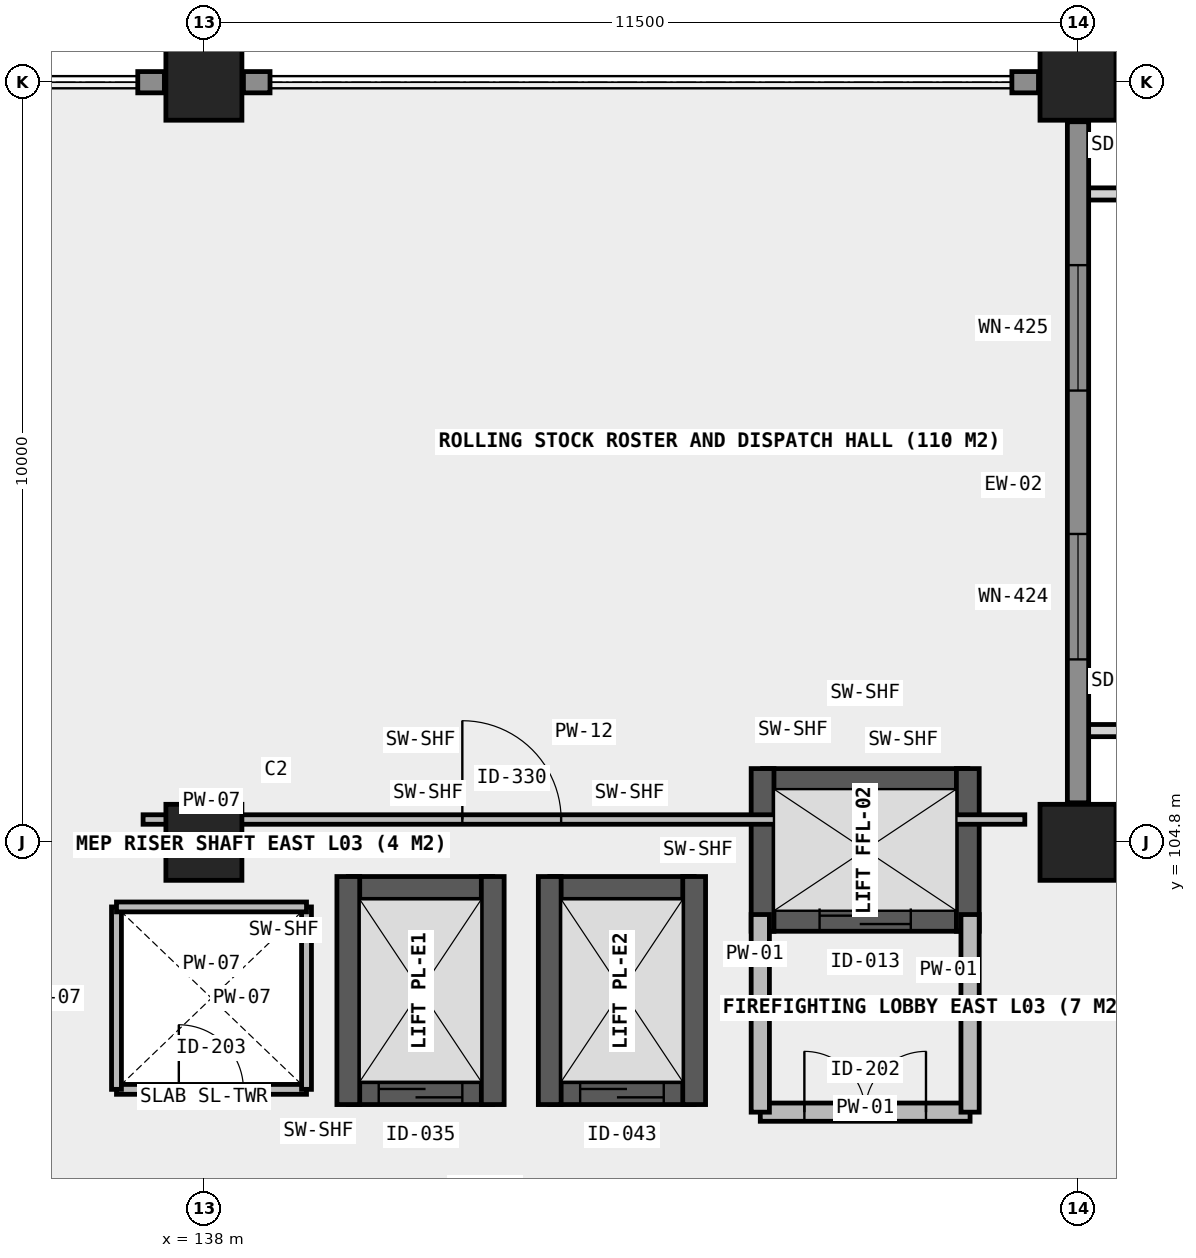
"""IFC4 building model, lengths in metres.
Left out: names, types, materials, properties, quantities, classifications, styles, units other than length and angle.
Written with IfcOpenShell. Run it as: python <this file> out.ifc"""

import sys

from ifc_helpers import new_model, si_unit, direction, frame, frame_2d, origin, origin_2d, place, context, subcontext, project, spatial, rectangle, extrude, element, fill, save


model = new_model("IFC4")
c1 = context("Model", 3, precision=1e-05, world=origin(), true_north=direction((0.0, 1.0)))
c2 = subcontext(c1, "Body", "Model", "MODEL_VIEW")
j1 = project(units=[si_unit("LENGTHUNIT", "METRE"), si_unit("PLANEANGLEUNIT", "RADIAN")], contexts=[c1])
p1 = place(None, origin())
s1 = spatial("IfcSite", under=j1, at=p1, CompositionType="ELEMENT")
p2 = place(p1, origin())
s2 = spatial("IfcBuilding", under=s1, at=p2, CompositionType="ELEMENT")
p3 = place(p2, frame((0.0, 0.0, 13.8)))
s3 = spatial("IfcBuildingStorey", under=s2, at=p3, CompositionType="ELEMENT", Elevation=13.8)
for number, where, z_axis, x_axis in (
    (1, (138.0, 104.8, 0.0), (0.0, 0.0, 1.0), (1.0, 0.0, 0.0)),
    (2, (138.0, 114.8, 0.0), (0.0, 0.0, 1.0), (1.0, 0.0, 0.0)),
    (3, (149.5, 104.8, 0.0), (0.0, 0.0, 1.0), (1.0, 0.0, 0.0)),
    (4, (149.5, 114.8, 0.0), (0.0, 0.0, 1.0), (1.0, 0.0, 0.0)),
):
    element("IfcColumn", number, at=place(p3, frame(where, z_axis=z_axis, x_axis=x_axis)), inside=s3, PredefinedType="COLUMN", context=c2, shape_type="SweptSolid", body=[
        extrude(rectangle(XDim=1.0, YDim=1.0, at=origin_2d()), origin(), (0.0, 0.0, 1.0), 4.5),
    ])
p4 = place(p3, frame((145.35, 103.78, 0.0), z_axis=(0.0, 0.0, 1.0), x_axis=(1.0, 0.0, 0.0)))
e5 = element("IfcWall", 5, at=p4, inside=s3, PredefinedType="SHEAR", context=c2, shape_type="SweptSolid", body=[
    extrude(rectangle(XDim=2.7, YDim=0.3, at=frame_2d((1.35, 0.0))), origin(), (0.0, 0.0, 1.0), 4.5),
])
p5 = place(p4, frame((0.75, 0.0, 0.0)))
e6 = element("IfcOpeningElement", 6, at=p5, cuts=e5, PredefinedType="OPENING", context=c2, shape_type="SweptSolid", body=[
    extrude(rectangle(XDim=1.2, YDim=2.15, at=frame_2d((0.6, 1.075))), frame((0.0, 0.16, 0.0), z_axis=(0.0, -1.0, 0.0), x_axis=(1.0, 0.0, 0.0)), (0.0, 0.0, 1.0), 0.32),
])
p6 = place(p3, frame((145.35, 105.62, 0.0), z_axis=(0.0, 0.0, 1.0), x_axis=(1.0, 0.0, 0.0)))
e7 = element("IfcWall", 7, at=p6, inside=s3, PredefinedType="SHEAR", context=c2, shape_type="SweptSolid", body=[
    extrude(rectangle(XDim=2.7, YDim=0.3, at=frame_2d((1.35, 0.0))), origin(), (0.0, 0.0, 1.0), 4.5),
])
for number, where, z_axis, x_axis in (
    (8, (145.35, 103.63, 0.0), (0.0, 0.0, 1.0), (0.0, 1.0, 0.0)),
    (9, (148.05, 103.63, 0.0), (0.0, 0.0, 1.0), (0.0, 1.0, 0.0)),
):
    element("IfcWall", number, at=place(p3, frame(where, z_axis=z_axis, x_axis=x_axis)), inside=s3, PredefinedType="SHEAR", context=c2, shape_type="SweptSolid", body=[
        extrude(rectangle(XDim=2.14, YDim=0.3, at=frame_2d((1.07, 0.0))), origin(), (0.0, 0.0, 1.0), 4.5),
    ])
p7 = place(p3, frame((139.9, 101.5, 0.0), z_axis=(0.0, 0.0, 1.0), x_axis=(1.0, 0.0, 0.0)))
e10 = element("IfcWall", 10, at=p7, inside=s3, PredefinedType="SHEAR", context=c2, shape_type="SweptSolid", body=[
    extrude(rectangle(XDim=1.9, YDim=0.3, at=frame_2d((0.95, 0.0))), origin(), (0.0, 0.0, 1.0), 4.5),
])
p8 = place(p7, frame((0.4, 0.0, 0.0)))
e11 = element("IfcOpeningElement", 11, at=p8, cuts=e10, PredefinedType="OPENING", context=c2, shape_type="SweptSolid", body=[
    extrude(rectangle(XDim=1.1, YDim=2.15, at=frame_2d((0.55, 1.075))), frame((0.0, 0.16, 0.0), z_axis=(0.0, -1.0, 0.0), x_axis=(1.0, 0.0, 0.0)), (0.0, 0.0, 1.0), 0.32),
])
p9 = place(p3, frame((139.9, 104.2, 0.0), z_axis=(0.0, 0.0, 1.0), x_axis=(1.0, 0.0, 0.0)))
e12 = element("IfcWall", 12, at=p9, inside=s3, PredefinedType="SHEAR", context=c2, shape_type="SweptSolid", body=[
    extrude(rectangle(XDim=1.9, YDim=0.3, at=frame_2d((0.95, 0.0))), origin(), (0.0, 0.0, 1.0), 4.5),
])
for number, where, z_axis, x_axis in (
    (13, (139.9, 101.35, 0.0), (0.0, 0.0, 1.0), (0.0, 1.0, 0.0)),
    (14, (141.8, 101.35, 0.0), (0.0, 0.0, 1.0), (0.0, 1.0, 0.0)),
):
    element("IfcWall", number, at=place(p3, frame(where, z_axis=z_axis, x_axis=x_axis)), inside=s3, PredefinedType="SHEAR", context=c2, shape_type="SweptSolid", body=[
        extrude(rectangle(XDim=3.0, YDim=0.3, at=frame_2d((1.5, 0.0))), origin(), (0.0, 0.0, 1.0), 4.5),
    ])
p10 = place(p3, frame((142.55, 101.5, 0.0), z_axis=(0.0, 0.0, 1.0), x_axis=(1.0, 0.0, 0.0)))
e15 = element("IfcWall", 15, at=p10, inside=s3, PredefinedType="SHEAR", context=c2, shape_type="SweptSolid", body=[
    extrude(rectangle(XDim=1.9, YDim=0.3, at=frame_2d((0.95, 0.0))), origin(), (0.0, 0.0, 1.0), 4.5),
])
p11 = place(p10, frame((0.4, 0.0, 0.0)))
e16 = element("IfcOpeningElement", 16, at=p11, cuts=e15, PredefinedType="OPENING", context=c2, shape_type="SweptSolid", body=[
    extrude(rectangle(XDim=1.1, YDim=2.15, at=frame_2d((0.55, 1.075))), frame((0.0, 0.16, 0.0), z_axis=(0.0, -1.0, 0.0), x_axis=(1.0, 0.0, 0.0)), (0.0, 0.0, 1.0), 0.32),
])
p12 = place(p3, frame((142.55, 104.2, 0.0), z_axis=(0.0, 0.0, 1.0), x_axis=(1.0, 0.0, 0.0)))
e17 = element("IfcWall", 17, at=p12, inside=s3, PredefinedType="SHEAR", context=c2, shape_type="SweptSolid", body=[
    extrude(rectangle(XDim=1.9, YDim=0.3, at=frame_2d((0.95, 0.0))), origin(), (0.0, 0.0, 1.0), 4.5),
])
for number, where, z_axis, x_axis in (
    (18, (142.55, 101.35, 0.0), (0.0, 0.0, 1.0), (0.0, 1.0, 0.0)),
    (19, (144.45, 101.35, 0.0), (0.0, 0.0, 1.0), (0.0, 1.0, 0.0)),
):
    element("IfcWall", number, at=place(p3, frame(where, z_axis=z_axis, x_axis=x_axis)), inside=s3, PredefinedType="SHEAR", context=c2, shape_type="SweptSolid", body=[
        extrude(rectangle(XDim=3.0, YDim=0.3, at=frame_2d((1.5, 0.0))), origin(), (0.0, 0.0, 1.0), 4.5),
    ])
p13 = place(p3, frame((149.5, 105.32, 0.0), z_axis=(0.0, 0.0, 1.0), x_axis=(0.0, 1.0, 0.0)))
e20 = element("IfcWall", 20, at=p13, inside=s3, PredefinedType="SOLIDWALL", context=c2, shape_type="SweptSolid", body=[
    extrude(rectangle(XDim=8.96, YDim=0.28, at=frame_2d((4.48, 0.0))), origin(), (0.0, 0.0, 1.0), 3.45),
])
p14 = place(p13, frame((1.887, 0.0, 0.85)))
e21 = element("IfcOpeningElement", 21, at=p14, cuts=e20, PredefinedType="OPENING", context=c2, shape_type="SweptSolid", body=[
    extrude(rectangle(XDim=1.65, YDim=1.9, at=frame_2d((0.825, 0.95))), frame((0.0, 0.15, 0.0), z_axis=(0.0, -1.0, 0.0), x_axis=(1.0, 0.0, 0.0)), (0.0, 0.0, 1.0), 0.3),
])
p15 = place(p13, frame((5.423, 0.0, 0.85)))
e22 = element("IfcOpeningElement", 22, at=p15, cuts=e20, PredefinedType="OPENING", context=c2, shape_type="SweptSolid", body=[
    extrude(rectangle(XDim=1.65, YDim=1.9, at=frame_2d((0.825, 0.95))), frame((0.0, 0.15, 0.0), z_axis=(0.0, -1.0, 0.0), x_axis=(1.0, 0.0, 0.0)), (0.0, 0.0, 1.0), 0.3),
])
for number, where, z_axis, x_axis in (
    (23, (137.13, 114.8, 0.0), (0.0, 0.0, 1.0), (1.0, 0.0, 0.0)),
    (24, (138.52, 114.8, 0.0), (0.0, 0.0, 1.0), (1.0, 0.0, 0.0)),
    (25, (148.63, 114.8, 0.0), (0.0, 0.0, 1.0), (1.0, 0.0, 0.0)),
):
    element("IfcWall", number, at=place(p3, frame(where, z_axis=z_axis, x_axis=x_axis)), inside=s3, PredefinedType="SOLIDWALL", context=c2, shape_type="SweptSolid", body=[
        extrude(rectangle(XDim=0.35, YDim=0.28, at=frame_2d((0.175, 0.0))), origin(), (0.0, 0.0, 1.0), 4.23),
    ])
p16 = place(p3, frame((145.32, 101.25, 0.0), z_axis=(0.0, 0.0, 1.0), x_axis=(1.0, 0.0, 0.0)))
e26 = element("IfcWall", 26, at=p16, inside=s3, PredefinedType="SOLIDWALL", context=c2, shape_type="SweptSolid", body=[
    extrude(rectangle(XDim=2.76, YDim=0.24, at=frame_2d((1.38, 0.0))), origin(), (0.0, 0.0, 1.0), 4.22),
])
p17 = place(p16, frame((0.58, 0.0, 0.0)))
e27 = element("IfcOpeningElement", 27, at=p17, cuts=e26, PredefinedType="OPENING", context=c2, shape_type="SweptSolid", body=[
    extrude(rectangle(XDim=1.6, YDim=2.15, at=frame_2d((0.8, 1.075))), frame((0.0, 0.13, 0.0), z_axis=(0.0, -1.0, 0.0), x_axis=(1.0, 0.0, 0.0)), (0.0, 0.0, 1.0), 0.26),
])
for number, where, z_axis, x_axis in (
    (28, (145.32, 101.25, 0.0), (0.0, 0.0, 1.0), (0.0, 1.0, 0.0)),
    (29, (148.08, 101.25, 0.0), (0.0, 0.0, 1.0), (0.0, 1.0, 0.0)),
):
    element("IfcWall", number, at=place(p3, frame(where, z_axis=z_axis, x_axis=x_axis)), inside=s3, PredefinedType="SOLIDWALL", context=c2, shape_type="SweptSolid", body=[
        extrude(rectangle(XDim=2.6, YDim=0.24, at=frame_2d((1.3, 0.0))), origin(), (0.0, 0.0, 1.0), 4.22),
    ])
p18 = place(p3, frame((136.85, 101.55, 0.0), z_axis=(0.0, 0.0, 1.0), x_axis=(1.0, 0.0, 0.0)))
e30 = element("IfcWall", 30, at=p18, inside=s3, PredefinedType="PLUMBINGWALL", context=c2, shape_type="SweptSolid", body=[
    extrude(rectangle(XDim=2.5, YDim=0.13, at=frame_2d((1.25, 0.0))), origin(), (0.0, 0.0, 1.0), 4.22),
])
p19 = place(p18, frame((0.82, 0.0, 0.0)))
e31 = element("IfcOpeningElement", 31, at=p19, cuts=e30, PredefinedType="OPENING", context=c2, shape_type="SweptSolid", body=[
    extrude(rectangle(XDim=0.85, YDim=2.0, at=frame_2d((0.425, 1.0))), frame((0.0, 0.075, 0.0), z_axis=(0.0, -1.0, 0.0), x_axis=(1.0, 0.0, 0.0)), (0.0, 0.0, 1.0), 0.15),
])
for number, where, z_axis, x_axis in (
    (32, (136.85, 101.55, 0.0), (0.0, 0.0, 1.0), (0.0, 1.0, 0.0)),
    (33, (139.35, 101.55, 0.0), (0.0, 0.0, 1.0), (0.0, 1.0, 0.0)),
):
    element("IfcWall", number, at=place(p3, frame(where, z_axis=z_axis, x_axis=x_axis)), inside=s3, PredefinedType="PLUMBINGWALL", context=c2, shape_type="SweptSolid", body=[
        extrude(rectangle(XDim=2.4, YDim=0.13, at=frame_2d((1.2, 0.0))), origin(), (0.0, 0.0, 1.0), 4.22),
    ])
p20 = place(p3, frame((136.85, 103.95, 0.0), z_axis=(0.0, 0.0, 1.0), x_axis=(1.0, 0.0, 0.0)))
e34 = element("IfcWall", 34, at=p20, inside=s3, PredefinedType="PLUMBINGWALL", context=c2, shape_type="SweptSolid", body=[
    extrude(rectangle(XDim=2.5, YDim=0.13, at=frame_2d((1.25, 0.0))), origin(), (0.0, 0.0, 1.0), 4.22),
])
p21 = place(p3, frame((137.2, 105.1, 0.0), z_axis=(0.0, 0.0, 1.0), x_axis=(1.0, 0.0, 0.0)))
e35 = element("IfcWall", 35, at=p21, inside=s3, PredefinedType="MOVABLE", context=c2, shape_type="SweptSolid", body=[
    extrude(rectangle(XDim=11.6, YDim=0.125, at=frame_2d((5.8, 0.0))), origin(), (0.0, 0.0, 1.0), 4.22),
])
p22 = place(p21, frame((4.2, 0.0, 0.0)))
e36 = element("IfcOpeningElement", 36, at=p22, cuts=e35, PredefinedType="OPENING", context=c2, shape_type="SweptSolid", body=[
    extrude(rectangle(XDim=1.3, YDim=2.2, at=frame_2d((0.65, 1.1))), frame((0.0, 0.073, 0.0), z_axis=(0.0, -1.0, 0.0), x_axis=(1.0, 0.0, 0.0)), (0.0, 0.0, 1.0), 0.145),
])
p23 = place(p14, origin())
e37 = element("IfcWindow", 37, at=p23, inside=s3, PartitioningType="SINGLE_PANEL", PredefinedType="WINDOW", context=c2, shape_type="SweptSolid", body=[
    extrude(rectangle(XDim=1.65, YDim=1.9, at=frame_2d((0.825, 0.95))), frame((0.0, 0.03, 0.0), z_axis=(0.0, -1.0, 0.0), x_axis=(1.0, 0.0, 0.0)), (0.0, 0.0, 1.0), 0.06),
])
fill(e21, e37)
p24 = place(p15, origin())
e38 = element("IfcWindow", 38, at=p24, inside=s3, PartitioningType="SINGLE_PANEL", PredefinedType="WINDOW", context=c2, shape_type="SweptSolid", body=[
    extrude(rectangle(XDim=1.65, YDim=1.9, at=frame_2d((0.825, 0.95))), frame((0.0, 0.03, 0.0), z_axis=(0.0, -1.0, 0.0), x_axis=(1.0, 0.0, 0.0)), (0.0, 0.0, 1.0), 0.06),
])
fill(e22, e38)
p25 = place(p5, origin())
e39 = element("IfcDoor", 39, at=p25, inside=s3, OperationType="SLIDING_TO_RIGHT", PredefinedType="DOOR", context=c2, shape_type="SweptSolid", body=[
    extrude(rectangle(XDim=1.2, YDim=2.15, at=frame_2d((0.6, 1.075))), frame((0.0, 0.025, 0.0), z_axis=(0.0, -1.0, 0.0), x_axis=(1.0, 0.0, 0.0)), (0.0, 0.0, 1.0), 0.05),
])
fill(e6, e39)
p26 = place(p8, origin())
e40 = element("IfcDoor", 40, at=p26, inside=s3, OperationType="SLIDING_TO_LEFT", PredefinedType="DOOR", context=c2, shape_type="SweptSolid", body=[
    extrude(rectangle(XDim=1.1, YDim=2.15, at=frame_2d((0.55, 1.075))), frame((0.0, 0.025, 0.0), z_axis=(0.0, -1.0, 0.0), x_axis=(1.0, 0.0, 0.0)), (0.0, 0.0, 1.0), 0.05),
])
fill(e11, e40)
p27 = place(p11, origin())
e41 = element("IfcDoor", 41, at=p27, inside=s3, OperationType="SLIDING_TO_LEFT", PredefinedType="DOOR", context=c2, shape_type="SweptSolid", body=[
    extrude(rectangle(XDim=1.1, YDim=2.15, at=frame_2d((0.55, 1.075))), frame((0.0, 0.025, 0.0), z_axis=(0.0, -1.0, 0.0), x_axis=(1.0, 0.0, 0.0)), (0.0, 0.0, 1.0), 0.05),
])
fill(e16, e41)
p28 = place(p17, origin())
e42 = element("IfcDoor", 42, at=p28, inside=s3, OperationType="DOUBLE_DOOR_SINGLE_SWING", PredefinedType="DOOR", context=c2, shape_type="SweptSolid", body=[
    extrude(rectangle(XDim=1.6, YDim=2.15, at=frame_2d((0.8, 1.075))), frame((0.0, 0.025, 0.0), z_axis=(0.0, -1.0, 0.0), x_axis=(1.0, 0.0, 0.0)), (0.0, 0.0, 1.0), 0.05),
])
fill(e27, e42)
p29 = place(p19, origin())
e43 = element("IfcDoor", 43, at=p29, inside=s3, OperationType="SINGLE_SWING_LEFT", PredefinedType="TRAPDOOR", context=c2, shape_type="SweptSolid", body=[
    extrude(rectangle(XDim=0.85, YDim=2.0, at=frame_2d((0.425, 1.0))), frame((0.0, 0.025, 0.0), z_axis=(0.0, -1.0, 0.0), x_axis=(1.0, 0.0, 0.0)), (0.0, 0.0, 1.0), 0.05),
])
fill(e31, e43)
p30 = place(p22, origin())
e44 = element("IfcDoor", 44, at=p30, inside=s3, OperationType="SINGLE_SWING_LEFT", PredefinedType="DOOR", context=c2, shape_type="SweptSolid", body=[
    extrude(rectangle(XDim=1.3, YDim=2.2, at=frame_2d((0.65, 1.1))), frame((0.0, 0.025, 0.0), z_axis=(0.0, -1.0, 0.0), x_axis=(1.0, 0.0, 0.0)), (0.0, 0.0, 1.0), 0.05),
])
fill(e36, e44)
save(model, sys.argv[1])
